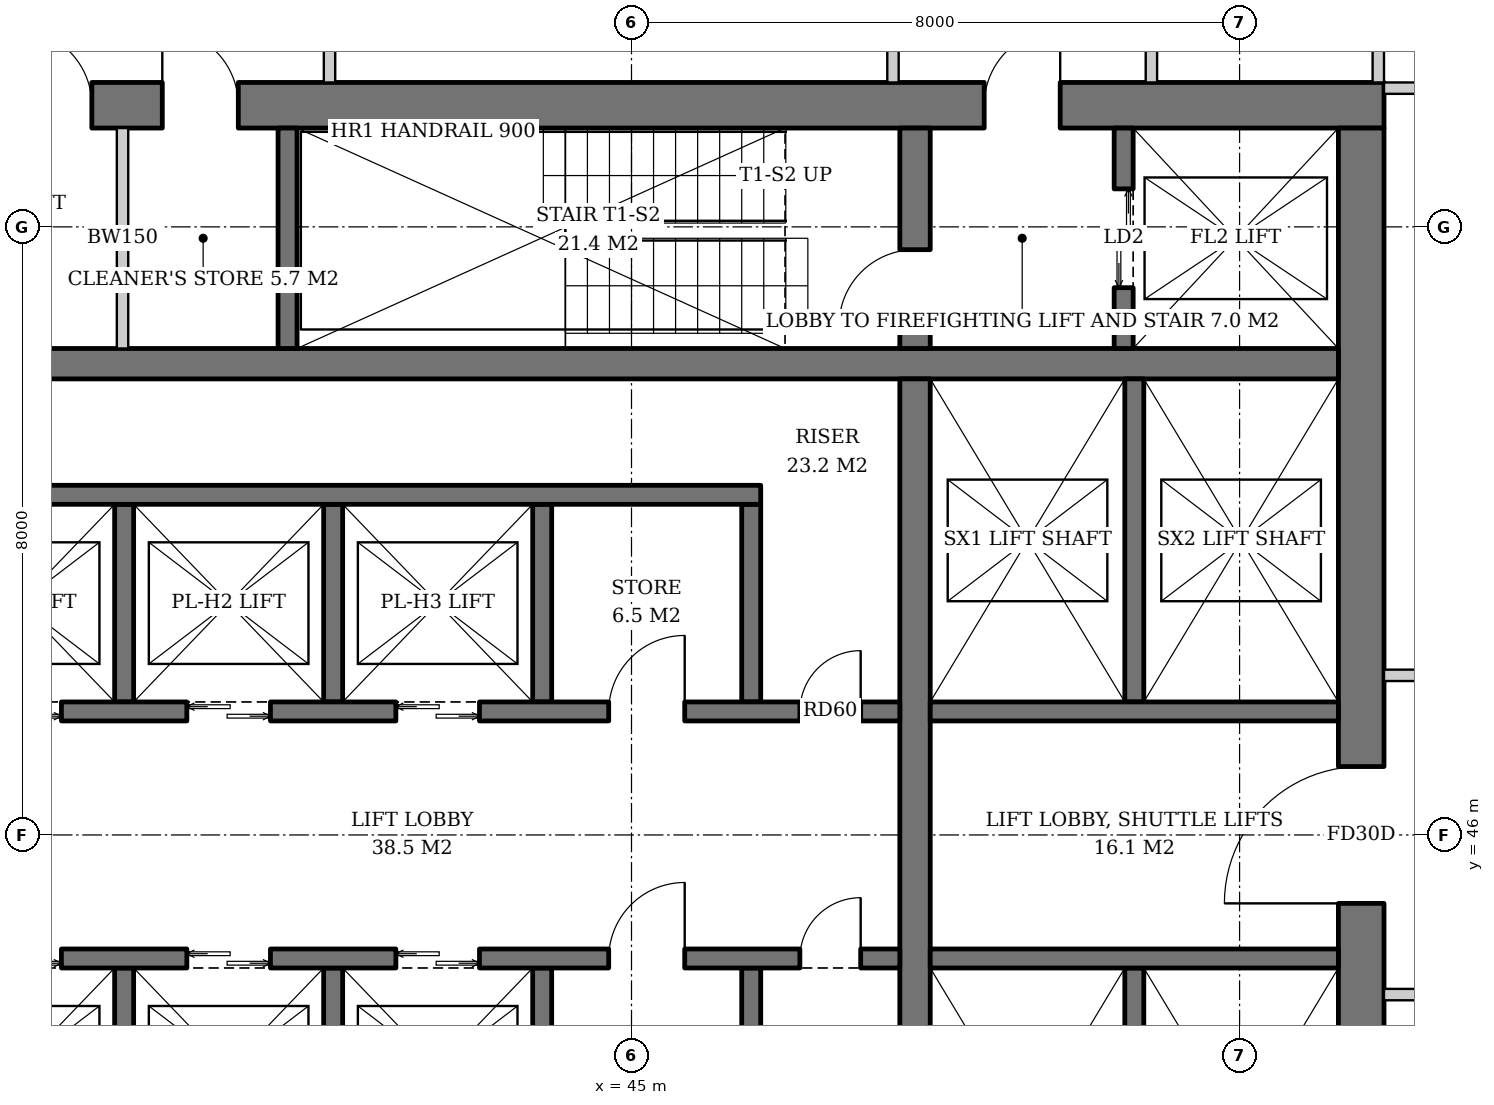
"""IFC4 building model, lengths in metres.
Left out: names, types, materials, properties, quantities, classifications, styles, units other than length and angle.
Written with IfcOpenShell. Run it as: python <this file> out.ifc"""

import sys

from ifc_helpers import new_model, si_unit, direction, frame, frame_2d, origin, place, context, subcontext, project, spatial, rectangle, extrude, element, fill, save


model = new_model("IFC4")
c1 = context("Model", 3, precision=1e-05, world=origin(), true_north=direction((0.0, 1.0)))
c2 = subcontext(c1, "Body", "Model", "MODEL_VIEW")
j1 = project(units=[si_unit("LENGTHUNIT", "METRE"), si_unit("PLANEANGLEUNIT", "RADIAN")], contexts=[c1])
p1 = place(None, origin())
s1 = spatial("IfcSite", under=j1, at=p1, CompositionType="ELEMENT")
p2 = place(p1, origin())
s2 = spatial("IfcBuilding", under=s1, at=p2, CompositionType="ELEMENT")
p3 = place(p2, frame((0.0, 0.0, 199.6)))
s3 = spatial("IfcBuildingStorey", under=s2, at=p3, CompositionType="ELEMENT", Elevation=199.6)
p4 = place(p3, frame((35.1, 55.6, 0.0), z_axis=(0.0, 0.0, 1.0), x_axis=(1.0, 0.0, 0.0)))
e1 = element("IfcWall", 1, at=p4, inside=s3, PredefinedType="SHEAR", context=c2, shape_type="SweptSolid", body=[
    extrude(rectangle(XDim=19.8, YDim=0.6, at=frame_2d((9.9, 0.0))), origin(), (0.0, 0.0, 1.0), 3.8),
])
p5 = place(p4, frame((14.54, 0.0, 0.0)))
e2 = element("IfcOpeningElement", 2, at=p5, cuts=e1, PredefinedType="OPENING", context=c2, shape_type="SweptSolid", body=[
    extrude(rectangle(XDim=1.0, YDim=2.1, at=frame_2d((0.5, 1.05))), frame((0.0, 0.31, 0.0), z_axis=(0.0, -1.0, 0.0), x_axis=(1.0, 0.0, 0.0)), (0.0, 0.0, 1.0), 0.62),
])
p6 = place(p4, frame((1.8, 0.0, 0.0)))
e3 = element("IfcOpeningElement", 3, at=p6, cuts=e1, PredefinedType="OPENING", context=c2, shape_type="SweptSolid", body=[
    extrude(rectangle(XDim=1.0, YDim=2.1, at=frame_2d((0.5, 1.05))), frame((0.0, 0.31, 0.0), z_axis=(0.0, -1.0, 0.0), x_axis=(1.0, 0.0, 0.0)), (0.0, 0.0, 1.0), 0.62),
])
p7 = place(p4, frame((3.727, 0.0, 0.0)))
e4 = element("IfcOpeningElement", 4, at=p7, cuts=e1, PredefinedType="OPENING", context=c2, shape_type="SweptSolid", body=[
    extrude(rectangle(XDim=1.0, YDim=2.1, at=frame_2d((0.5, 1.05))), frame((0.0, 0.31, 0.0), z_axis=(0.0, -1.0, 0.0), x_axis=(1.0, 0.0, 0.0)), (0.0, 0.0, 1.0), 0.62),
])
p8 = place(p3, frame((54.6, 36.7, 0.0), z_axis=(0.0, 0.0, 1.0), x_axis=(0.0, 1.0, 0.0)))
e5 = element("IfcWall", 5, at=p8, inside=s3, PredefinedType="SHEAR", context=c2, shape_type="SweptSolid", body=[
    extrude(rectangle(XDim=18.6, YDim=0.6, at=frame_2d((9.3, 0.0))), origin(), (0.0, 0.0, 1.0), 3.8),
])
p9 = place(p8, frame((8.4, 0.0, 0.0)))
e6 = element("IfcOpeningElement", 6, at=p9, cuts=e5, PredefinedType="OPENING", context=c2, shape_type="SweptSolid", body=[
    extrude(rectangle(XDim=1.8, YDim=2.4, at=frame_2d((0.9, 1.2))), frame((0.0, 0.31, 0.0), z_axis=(0.0, -1.0, 0.0), x_axis=(1.0, 0.0, 0.0)), (0.0, 0.0, 1.0), 0.62),
])
p10 = place(p3, frame((35.7, 52.2, 0.0), z_axis=(0.0, 0.0, 1.0), x_axis=(1.0, 0.0, 0.0)))
e7 = element("IfcWall", 7, at=p10, inside=s3, PredefinedType="SHEAR", context=c2, shape_type="SweptSolid", body=[
    extrude(rectangle(XDim=18.6, YDim=0.4, at=frame_2d((9.3, 0.0))), origin(), (0.0, 0.0, 1.0), 3.8),
])
p11 = place(p3, frame((48.73, 40.0, 0.0), z_axis=(0.0, 0.0, 1.0), x_axis=(0.0, 1.0, 0.0)))
e8 = element("IfcWall", 8, at=p11, inside=s3, PredefinedType="SHEAR", context=c2, shape_type="SweptSolid", body=[
    extrude(rectangle(XDim=12.0, YDim=0.4, at=frame_2d((6.0, 0.0))), origin(), (0.0, 0.0, 1.0), 3.8),
])
p12 = place(p3, frame((48.73, 52.4, 0.0), z_axis=(0.0, 0.0, 1.0), x_axis=(0.0, 1.0, 0.0)))
e9 = element("IfcWall", 9, at=p12, inside=s3, PredefinedType="SHEAR", context=c2, shape_type="SweptSolid", body=[
    extrude(rectangle(XDim=2.9, YDim=0.4, at=frame_2d((1.45, 0.0))), origin(), (0.0, 0.0, 1.0), 3.8),
])
p13 = place(p12, frame((0.3, 0.0, 0.0)))
e10 = element("IfcOpeningElement", 10, at=p13, cuts=e9, PredefinedType="OPENING", context=c2, shape_type="SweptSolid", body=[
    extrude(rectangle(XDim=1.0, YDim=2.1, at=frame_2d((0.5, 1.05))), frame((0.0, 0.21, 0.0), z_axis=(0.0, -1.0, 0.0), x_axis=(1.0, 0.0, 0.0)), (0.0, 0.0, 1.0), 0.42),
])
p14 = place(p3, frame((40.475, 52.4, 0.0), z_axis=(0.0, 0.0, 1.0), x_axis=(0.0, 1.0, 0.0)))
e11 = element("IfcWall", 11, at=p14, inside=s3, PredefinedType="SHEAR", context=c2, shape_type="SweptSolid", body=[
    extrude(rectangle(XDim=2.9, YDim=0.25, at=frame_2d((1.45, 0.0))), origin(), (0.0, 0.0, 1.0), 3.8),
])
p15 = place(p3, frame((51.475, 52.4, 0.0), z_axis=(0.0, 0.0, 1.0), x_axis=(0.0, 1.0, 0.0)))
e12 = element("IfcWall", 12, at=p15, inside=s3, PredefinedType="SHEAR", context=c2, shape_type="SweptSolid", body=[
    extrude(rectangle(XDim=2.9, YDim=0.25, at=frame_2d((1.45, 0.0))), origin(), (0.0, 0.0, 1.0), 3.8),
])
p16 = place(p15, frame((0.8, 0.0, 0.0)))
e13 = element("IfcOpeningElement", 13, at=p16, cuts=e12, PredefinedType="OPENING", context=c2, shape_type="SweptSolid", body=[
    extrude(rectangle(XDim=1.3, YDim=2.2, at=frame_2d((0.65, 1.1))), frame((0.0, 0.135, 0.0), z_axis=(0.0, -1.0, 0.0), x_axis=(1.0, 0.0, 0.0)), (0.0, 0.0, 1.0), 0.27),
])
for number, where, z_axis, x_axis in (
    (14, (38.325, 47.75, 0.0), (0.0, 0.0, 1.0), (0.0, 1.0, 0.0)),
    (15, (41.075, 47.75, 0.0), (0.0, 0.0, 1.0), (0.0, 1.0, 0.0)),
    (16, (43.825, 47.75, 0.0), (0.0, 0.0, 1.0), (0.0, 1.0, 0.0)),
    (17, (46.575, 47.75, 0.0), (0.0, 0.0, 1.0), (0.0, 1.0, 0.0)),
):
    element("IfcWall", number, at=place(p3, frame(where, z_axis=z_axis, x_axis=x_axis)), inside=s3, PredefinedType="SHEAR", context=c2, shape_type="SweptSolid", body=[
        extrude(rectangle(XDim=2.6, YDim=0.25, at=frame_2d((1.3, 0.0))), origin(), (0.0, 0.0, 1.0), 3.8),
    ])
p17 = place(p3, frame((35.7, 50.475, 0.0), z_axis=(0.0, 0.0, 1.0), x_axis=(1.0, 0.0, 0.0)))
e18 = element("IfcWall", 18, at=p17, inside=s3, PredefinedType="SHEAR", context=c2, shape_type="SweptSolid", body=[
    extrude(rectangle(XDim=11.0, YDim=0.25, at=frame_2d((5.5, 0.0))), origin(), (0.0, 0.0, 1.0), 3.8),
])
p18 = place(p3, frame((35.7, 47.625, 0.0), z_axis=(0.0, 0.0, 1.0), x_axis=(1.0, 0.0, 0.0)))
e19 = element("IfcWall", 19, at=p18, inside=s3, PredefinedType="SHEAR", context=c2, shape_type="SweptSolid", body=[
    extrude(rectangle(XDim=12.83, YDim=0.25, at=frame_2d((6.415, 0.0))), origin(), (0.0, 0.0, 1.0), 3.8),
])
p19 = place(p18, frame((0.7, 0.0, 0.0)))
e20 = element("IfcOpeningElement", 20, at=p19, cuts=e19, PredefinedType="OPENING", context=c2, shape_type="SweptSolid", body=[
    extrude(rectangle(XDim=1.1, YDim=2.2, at=frame_2d((0.55, 1.1))), frame((0.0, 0.135, 0.0), z_axis=(0.0, -1.0, 0.0), x_axis=(1.0, 0.0, 0.0)), (0.0, 0.0, 1.0), 0.27),
])
p20 = place(p18, frame((3.45, 0.0, 0.0)))
e21 = element("IfcOpeningElement", 21, at=p20, cuts=e19, PredefinedType="OPENING", context=c2, shape_type="SweptSolid", body=[
    extrude(rectangle(XDim=1.1, YDim=2.2, at=frame_2d((0.55, 1.1))), frame((0.0, 0.135, 0.0), z_axis=(0.0, -1.0, 0.0), x_axis=(1.0, 0.0, 0.0)), (0.0, 0.0, 1.0), 0.27),
])
p21 = place(p18, frame((6.2, 0.0, 0.0)))
e22 = element("IfcOpeningElement", 22, at=p21, cuts=e19, PredefinedType="OPENING", context=c2, shape_type="SweptSolid", body=[
    extrude(rectangle(XDim=1.1, YDim=2.2, at=frame_2d((0.55, 1.1))), frame((0.0, 0.135, 0.0), z_axis=(0.0, -1.0, 0.0), x_axis=(1.0, 0.0, 0.0)), (0.0, 0.0, 1.0), 0.27),
])
p22 = place(p18, frame((9.0, 0.0, 0.0)))
e23 = element("IfcOpeningElement", 23, at=p22, cuts=e19, PredefinedType="OPENING", context=c2, shape_type="SweptSolid", body=[
    extrude(rectangle(XDim=1.0, YDim=2.1, at=frame_2d((0.5, 1.05))), frame((0.0, 0.135, 0.0), z_axis=(0.0, -1.0, 0.0), x_axis=(1.0, 0.0, 0.0)), (0.0, 0.0, 1.0), 0.27),
])
p23 = place(p18, frame((11.515, 0.0, 0.0)))
e24 = element("IfcOpeningElement", 24, at=p23, cuts=e19, PredefinedType="OPENING", context=c2, shape_type="SweptSolid", body=[
    extrude(rectangle(XDim=0.8, YDim=2.0, at=frame_2d((0.4, 1.0))), frame((0.0, 0.135, 0.0), z_axis=(0.0, -1.0, 0.0), x_axis=(1.0, 0.0, 0.0)), (0.0, 0.0, 1.0), 0.27),
])
for number, where, z_axis, x_axis in (
    (25, (38.325, 44.25, 0.0), (0.0, 0.0, 1.0), (0.0, -1.0, 0.0)),
    (26, (41.075, 44.25, 0.0), (0.0, 0.0, 1.0), (0.0, -1.0, 0.0)),
    (27, (43.825, 44.25, 0.0), (0.0, 0.0, 1.0), (0.0, -1.0, 0.0)),
    (28, (46.575, 44.25, 0.0), (0.0, 0.0, 1.0), (0.0, -1.0, 0.0)),
):
    element("IfcWall", number, at=place(p3, frame(where, z_axis=z_axis, x_axis=x_axis)), inside=s3, PredefinedType="SHEAR", context=c2, shape_type="SweptSolid", body=[
        extrude(rectangle(XDim=2.6, YDim=0.25, at=frame_2d((1.3, 0.0))), origin(), (0.0, 0.0, 1.0), 3.8),
    ])
p24 = place(p3, frame((35.7, 44.375, 0.0), z_axis=(0.0, 0.0, 1.0), x_axis=(1.0, 0.0, 0.0)))
e29 = element("IfcWall", 29, at=p24, inside=s3, PredefinedType="SHEAR", context=c2, shape_type="SweptSolid", body=[
    extrude(rectangle(XDim=12.83, YDim=0.25, at=frame_2d((6.415, 0.0))), origin(), (0.0, 0.0, 1.0), 3.8),
])
p25 = place(p24, frame((0.7, 0.0, 0.0)))
e30 = element("IfcOpeningElement", 30, at=p25, cuts=e29, PredefinedType="OPENING", context=c2, shape_type="SweptSolid", body=[
    extrude(rectangle(XDim=1.1, YDim=2.2, at=frame_2d((0.55, 1.1))), frame((0.0, 0.135, 0.0), z_axis=(0.0, -1.0, 0.0), x_axis=(1.0, 0.0, 0.0)), (0.0, 0.0, 1.0), 0.27),
])
p26 = place(p24, frame((3.45, 0.0, 0.0)))
e31 = element("IfcOpeningElement", 31, at=p26, cuts=e29, PredefinedType="OPENING", context=c2, shape_type="SweptSolid", body=[
    extrude(rectangle(XDim=1.1, YDim=2.2, at=frame_2d((0.55, 1.1))), frame((0.0, 0.135, 0.0), z_axis=(0.0, -1.0, 0.0), x_axis=(1.0, 0.0, 0.0)), (0.0, 0.0, 1.0), 0.27),
])
p27 = place(p24, frame((6.2, 0.0, 0.0)))
e32 = element("IfcOpeningElement", 32, at=p27, cuts=e29, PredefinedType="OPENING", context=c2, shape_type="SweptSolid", body=[
    extrude(rectangle(XDim=1.1, YDim=2.2, at=frame_2d((0.55, 1.1))), frame((0.0, 0.135, 0.0), z_axis=(0.0, -1.0, 0.0), x_axis=(1.0, 0.0, 0.0)), (0.0, 0.0, 1.0), 0.27),
])
p28 = place(p24, frame((9.0, 0.0, 0.0)))
e33 = element("IfcOpeningElement", 33, at=p28, cuts=e29, PredefinedType="OPENING", context=c2, shape_type="SweptSolid", body=[
    extrude(rectangle(XDim=1.0, YDim=2.1, at=frame_2d((0.5, 1.05))), frame((0.0, 0.135, 0.0), z_axis=(0.0, -1.0, 0.0), x_axis=(1.0, 0.0, 0.0)), (0.0, 0.0, 1.0), 0.27),
])
p29 = place(p24, frame((11.515, 0.0, 0.0)))
e34 = element("IfcOpeningElement", 34, at=p29, cuts=e29, PredefinedType="OPENING", context=c2, shape_type="SweptSolid", body=[
    extrude(rectangle(XDim=0.8, YDim=2.0, at=frame_2d((0.4, 1.0))), frame((0.0, 0.135, 0.0), z_axis=(0.0, -1.0, 0.0), x_axis=(1.0, 0.0, 0.0)), (0.0, 0.0, 1.0), 0.27),
])
p30 = place(p3, frame((51.615, 47.75, 0.0), z_axis=(0.0, 0.0, 1.0), x_axis=(0.0, 1.0, 0.0)))
e35 = element("IfcWall", 35, at=p30, inside=s3, PredefinedType="SHEAR", context=c2, shape_type="SweptSolid", body=[
    extrude(rectangle(XDim=4.25, YDim=0.25, at=frame_2d((2.125, 0.0))), origin(), (0.0, 0.0, 1.0), 3.8),
])
p31 = place(p3, frame((48.93, 47.625, 0.0), z_axis=(0.0, 0.0, 1.0), x_axis=(1.0, 0.0, 0.0)))
e36 = element("IfcWall", 36, at=p31, inside=s3, PredefinedType="SHEAR", context=c2, shape_type="SweptSolid", body=[
    extrude(rectangle(XDim=5.37, YDim=0.25, at=frame_2d((2.685, 0.0))), origin(), (0.0, 0.0, 1.0), 3.8),
])
p32 = place(p3, frame((51.615, 44.25, 0.0), z_axis=(0.0, 0.0, 1.0), x_axis=(0.0, -1.0, 0.0)))
e37 = element("IfcWall", 37, at=p32, inside=s3, PredefinedType="SHEAR", context=c2, shape_type="SweptSolid", body=[
    extrude(rectangle(XDim=4.25, YDim=0.25, at=frame_2d((2.125, 0.0))), origin(), (0.0, 0.0, 1.0), 3.8),
])
p33 = place(p3, frame((48.93, 44.375, 0.0), z_axis=(0.0, 0.0, 1.0), x_axis=(1.0, 0.0, 0.0)))
e38 = element("IfcWall", 38, at=p33, inside=s3, PredefinedType="SHEAR", context=c2, shape_type="SweptSolid", body=[
    extrude(rectangle(XDim=5.37, YDim=0.25, at=frame_2d((2.685, 0.0))), origin(), (0.0, 0.0, 1.0), 3.8),
])
p34 = place(p3, frame((38.304, 52.4, 0.0), z_axis=(0.0, 0.0, 1.0), x_axis=(0.0, 1.0, 0.0)))
e39 = element("IfcWall", 39, at=p34, inside=s3, PredefinedType="SOLIDWALL", context=c2, shape_type="SweptSolid", body=[
    extrude(rectangle(XDim=2.9, YDim=0.15, at=frame_2d((1.45, 0.0))), origin(), (0.0, 0.0, 1.0), 3.62),
])
p35 = place(p3, frame((54.9, 43.9, 0.0), z_axis=(0.0, 0.0, 1.0), x_axis=(1.0, 0.0, 0.0)))
e40 = element("IfcWall", 40, at=p35, inside=s3, PredefinedType="PARTITIONING", context=c2, shape_type="SweptSolid", body=[
    extrude(rectangle(XDim=2.325, YDim=0.15, at=frame_2d((1.163, 0.0))), origin(), (0.0, 0.0, 1.0), 3.62),
])
p36 = place(p3, frame((54.9, 48.1, 0.0), z_axis=(0.0, 0.0, 1.0), x_axis=(1.0, 0.0, 0.0)))
e41 = element("IfcWall", 41, at=p36, inside=s3, PredefinedType="PARTITIONING", context=c2, shape_type="SweptSolid", body=[
    extrude(rectangle(XDim=2.325, YDim=0.15, at=frame_2d((1.163, 0.0))), origin(), (0.0, 0.0, 1.0), 2.867),
])
p37 = place(p3, frame((54.9, 55.825, 0.0), z_axis=(0.0, 0.0, 1.0), x_axis=(1.0, 0.0, 0.0)))
e42 = element("IfcWall", 42, at=p37, inside=s3, PredefinedType="PARTITIONING", context=c2, shape_type="SweptSolid", body=[
    extrude(rectangle(XDim=2.325, YDim=0.15, at=frame_2d((1.163, 0.0))), origin(), (0.0, 0.0, 1.0), 3.62),
])
p38 = place(p3, frame((54.825, 55.9, 0.0), z_axis=(0.0, 0.0, 1.0), x_axis=(0.0, 1.0, 0.0)))
e43 = element("IfcWall", 43, at=p38, inside=s3, PredefinedType="PARTITIONING", context=c2, shape_type="SweptSolid", body=[
    extrude(rectangle(XDim=2.325, YDim=0.15, at=frame_2d((1.163, 0.0))), origin(), (0.0, 0.0, 1.0), 2.867),
])
for number, where, z_axis, x_axis in (
    (44, (51.84, 55.9, 0.0), (0.0, 0.0, 1.0), (0.0, 1.0, 0.0)),
    (45, (48.44, 55.9, 0.0), (0.0, 0.0, 1.0), (0.0, 1.0, 0.0)),
    (46, (41.027, 55.9, 0.0), (0.0, 0.0, 1.0), (0.0, 1.0, 0.0)),
):
    element("IfcWall", number, at=place(p3, frame(where, z_axis=z_axis, x_axis=x_axis)), inside=s3, PredefinedType="PARTITIONING", context=c2, shape_type="SweptSolid", body=[
        extrude(rectangle(XDim=2.325, YDim=0.15, at=frame_2d((1.163, 0.0))), origin(), (0.0, 0.0, 1.0), 3.62),
    ])
p39 = place(p16, origin())
e47 = element("IfcDoor", 47, at=p39, inside=s3, OperationType="DOUBLE_DOOR_SLIDING", PredefinedType="DOOR", context=c2, shape_type="SweptSolid", body=[
    extrude(rectangle(XDim=1.3, YDim=2.2, at=frame_2d((0.65, 1.1))), frame((0.0, 0.025, 0.0), z_axis=(0.0, -1.0, 0.0), x_axis=(1.0, 0.0, 0.0)), (0.0, 0.0, 1.0), 0.05),
])
fill(e13, e47)
p40 = place(p19, origin())
e48 = element("IfcDoor", 48, at=p40, inside=s3, OperationType="DOUBLE_DOOR_SLIDING", PredefinedType="DOOR", context=c2, shape_type="SweptSolid", body=[
    extrude(rectangle(XDim=1.1, YDim=2.2, at=frame_2d((0.55, 1.1))), frame((0.0, 0.025, 0.0), z_axis=(0.0, -1.0, 0.0), x_axis=(1.0, 0.0, 0.0)), (0.0, 0.0, 1.0), 0.05),
])
fill(e20, e48)
p41 = place(p20, origin())
e49 = element("IfcDoor", 49, at=p41, inside=s3, OperationType="DOUBLE_DOOR_SLIDING", PredefinedType="DOOR", context=c2, shape_type="SweptSolid", body=[
    extrude(rectangle(XDim=1.1, YDim=2.2, at=frame_2d((0.55, 1.1))), frame((0.0, 0.025, 0.0), z_axis=(0.0, -1.0, 0.0), x_axis=(1.0, 0.0, 0.0)), (0.0, 0.0, 1.0), 0.05),
])
fill(e21, e49)
p42 = place(p21, origin())
e50 = element("IfcDoor", 50, at=p42, inside=s3, OperationType="DOUBLE_DOOR_SLIDING", PredefinedType="DOOR", context=c2, shape_type="SweptSolid", body=[
    extrude(rectangle(XDim=1.1, YDim=2.2, at=frame_2d((0.55, 1.1))), frame((0.0, 0.025, 0.0), z_axis=(0.0, -1.0, 0.0), x_axis=(1.0, 0.0, 0.0)), (0.0, 0.0, 1.0), 0.05),
])
fill(e22, e50)
p43 = place(p22, origin())
e51 = element("IfcDoor", 51, at=p43, inside=s3, OperationType="SINGLE_SWING_RIGHT", PredefinedType="DOOR", context=c2, shape_type="SweptSolid", body=[
    extrude(rectangle(XDim=1.0, YDim=2.1, at=frame_2d((0.5, 1.05))), frame((0.0, 0.025, 0.0), z_axis=(0.0, -1.0, 0.0), x_axis=(1.0, 0.0, 0.0)), (0.0, 0.0, 1.0), 0.05),
])
fill(e23, e51)
p44 = place(p23, origin())
e52 = element("IfcDoor", 52, at=p44, inside=s3, OperationType="SINGLE_SWING_RIGHT", PredefinedType="DOOR", context=c2, shape_type="SweptSolid", body=[
    extrude(rectangle(XDim=0.8, YDim=2.0, at=frame_2d((0.4, 1.0))), frame((0.0, 0.025, 0.0), z_axis=(0.0, -1.0, 0.0), x_axis=(1.0, 0.0, 0.0)), (0.0, 0.0, 1.0), 0.05),
])
fill(e24, e52)
p45 = place(p25, origin())
e53 = element("IfcDoor", 53, at=p45, inside=s3, OperationType="DOUBLE_DOOR_SLIDING", PredefinedType="DOOR", context=c2, shape_type="SweptSolid", body=[
    extrude(rectangle(XDim=1.1, YDim=2.2, at=frame_2d((0.55, 1.1))), frame((0.0, 0.025, 0.0), z_axis=(0.0, -1.0, 0.0), x_axis=(1.0, 0.0, 0.0)), (0.0, 0.0, 1.0), 0.05),
])
fill(e30, e53)
p46 = place(p26, origin())
e54 = element("IfcDoor", 54, at=p46, inside=s3, OperationType="DOUBLE_DOOR_SLIDING", PredefinedType="DOOR", context=c2, shape_type="SweptSolid", body=[
    extrude(rectangle(XDim=1.1, YDim=2.2, at=frame_2d((0.55, 1.1))), frame((0.0, 0.025, 0.0), z_axis=(0.0, -1.0, 0.0), x_axis=(1.0, 0.0, 0.0)), (0.0, 0.0, 1.0), 0.05),
])
fill(e31, e54)
p47 = place(p27, origin())
e55 = element("IfcDoor", 55, at=p47, inside=s3, OperationType="DOUBLE_DOOR_SLIDING", PredefinedType="DOOR", context=c2, shape_type="SweptSolid", body=[
    extrude(rectangle(XDim=1.1, YDim=2.2, at=frame_2d((0.55, 1.1))), frame((0.0, 0.025, 0.0), z_axis=(0.0, -1.0, 0.0), x_axis=(1.0, 0.0, 0.0)), (0.0, 0.0, 1.0), 0.05),
])
fill(e32, e55)
p48 = place(p28, origin())
e56 = element("IfcDoor", 56, at=p48, inside=s3, OperationType="SINGLE_SWING_RIGHT", PredefinedType="DOOR", context=c2, shape_type="SweptSolid", body=[
    extrude(rectangle(XDim=1.0, YDim=2.1, at=frame_2d((0.5, 1.05))), frame((0.0, 0.025, 0.0), z_axis=(0.0, -1.0, 0.0), x_axis=(1.0, 0.0, 0.0)), (0.0, 0.0, 1.0), 0.05),
])
fill(e33, e56)
p49 = place(p29, origin())
e57 = element("IfcDoor", 57, at=p49, inside=s3, OperationType="SINGLE_SWING_RIGHT", PredefinedType="DOOR", context=c2, shape_type="SweptSolid", body=[
    extrude(rectangle(XDim=0.8, YDim=2.0, at=frame_2d((0.4, 1.0))), frame((0.0, 0.025, 0.0), z_axis=(0.0, -1.0, 0.0), x_axis=(1.0, 0.0, 0.0)), (0.0, 0.0, 1.0), 0.05),
])
fill(e34, e57)
p50 = place(p13, origin())
e58 = element("IfcDoor", 58, at=p50, inside=s3, OperationType="SINGLE_SWING_LEFT", PredefinedType="DOOR", context=c2, shape_type="SweptSolid", body=[
    extrude(rectangle(XDim=1.0, YDim=2.1, at=frame_2d((0.5, 1.05))), frame((0.0, 0.025, 0.0), z_axis=(0.0, -1.0, 0.0), x_axis=(1.0, 0.0, 0.0)), (0.0, 0.0, 1.0), 0.05),
])
fill(e10, e58)
p51 = place(p5, origin())
e59 = element("IfcDoor", 59, at=p51, inside=s3, OperationType="SINGLE_SWING_RIGHT", PredefinedType="DOOR", context=c2, shape_type="SweptSolid", body=[
    extrude(rectangle(XDim=1.0, YDim=2.1, at=frame_2d((0.5, 1.05))), frame((0.0, 0.025, 0.0), z_axis=(0.0, -1.0, 0.0), x_axis=(1.0, 0.0, 0.0)), (0.0, 0.0, 1.0), 0.05),
])
fill(e2, e59)
p52 = place(p9, origin())
e60 = element("IfcDoor", 60, at=p52, inside=s3, OperationType="DOUBLE_DOOR_SINGLE_SWING", PredefinedType="DOOR", context=c2, shape_type="SweptSolid", body=[
    extrude(rectangle(XDim=1.8, YDim=2.4, at=frame_2d((0.9, 1.2))), frame((0.0, 0.025, 0.0), z_axis=(0.0, -1.0, 0.0), x_axis=(1.0, 0.0, 0.0)), (0.0, 0.0, 1.0), 0.05),
])
fill(e6, e60)
p53 = place(p6, origin())
e61 = element("IfcDoor", 61, at=p53, inside=s3, OperationType="SINGLE_SWING_LEFT", PredefinedType="DOOR", context=c2, shape_type="SweptSolid", body=[
    extrude(rectangle(XDim=1.0, YDim=2.1, at=frame_2d((0.5, 1.05))), frame((0.0, -0.24, 0.0), z_axis=(0.0, -1.0, 0.0), x_axis=(1.0, 0.0, 0.0)), (0.0, 0.0, 1.0), 0.05),
])
fill(e3, e61)
p54 = place(p7, origin())
e62 = element("IfcDoor", 62, at=p54, inside=s3, OperationType="SINGLE_SWING_LEFT", PredefinedType="DOOR", context=c2, shape_type="SweptSolid", body=[
    extrude(rectangle(XDim=1.0, YDim=2.1, at=frame_2d((0.5, 1.05))), frame((0.0, -0.24, 0.0), z_axis=(0.0, -1.0, 0.0), x_axis=(1.0, 0.0, 0.0)), (0.0, 0.0, 1.0), 0.05),
])
fill(e4, e62)
save(model, sys.argv[1])
